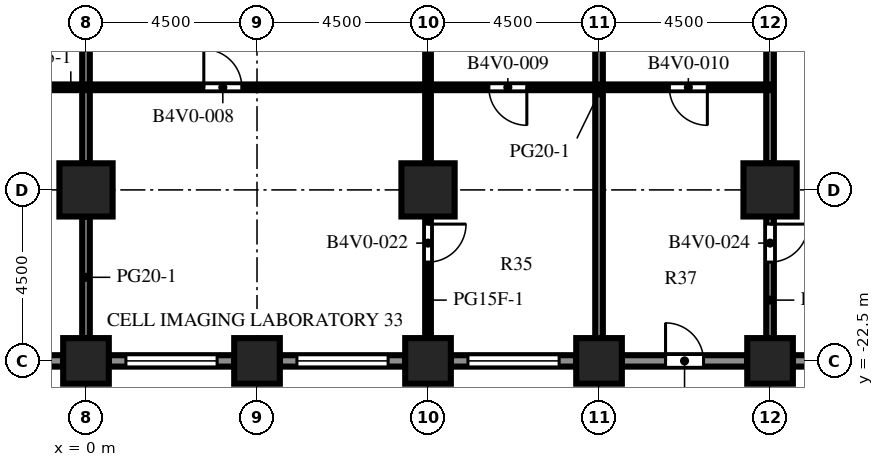
"""IFC4 building model, lengths in metres.
Left out: names, types, materials, properties, quantities, classifications, styles, units other than length and angle.
Written with IfcOpenShell. Run it as: python <this file> out.ifc"""

import sys

from ifc_helpers import new_model, si_unit, direction, frame, frame_2d, origin, origin_2d, place, context, subcontext, project, spatial, rectangle, extrude, element, fill, save


model = new_model("IFC4")
c1 = context("Model", 3, precision=1e-05, world=origin(), true_north=direction((0.0, 1.0)))
c2 = subcontext(c1, "Body", "Model", "MODEL_VIEW")
j1 = project(units=[si_unit("LENGTHUNIT", "METRE"), si_unit("PLANEANGLEUNIT", "RADIAN")], contexts=[c1])
p1 = place(None, origin())
s1 = spatial("IfcSite", under=j1, at=p1, CompositionType="ELEMENT")
p2 = place(p1, origin())
s2 = spatial("IfcBuilding", under=s1, at=p2, CompositionType="ELEMENT")
p3 = place(p2, frame((0.0, 0.0, 120.8)))
s3 = spatial("IfcBuildingStorey", under=s2, at=p3, CompositionType="ELEMENT", Elevation=120.8)
for number, where, z_axis, x_axis in (
    (1, (0.0, -22.5, 0.0), (0.0, 0.0, 1.0), (1.0, 0.0, 0.0)),
    (2, (4.5, -22.5, 0.0), (0.0, 0.0, 1.0), (1.0, 0.0, 0.0)),
    (3, (9.0, -22.5, 0.0), (0.0, 0.0, 1.0), (1.0, 0.0, 0.0)),
    (4, (13.5, -22.5, 0.0), (0.0, 0.0, 1.0), (1.0, 0.0, 0.0)),
    (5, (18.0, -22.5, 0.0), (0.0, 0.0, 1.0), (1.0, 0.0, 0.0)),
):
    element("IfcColumn", number, at=place(p3, frame(where, z_axis=z_axis, x_axis=x_axis)), inside=s3, PredefinedType="COLUMN", context=c2, shape_type="SweptSolid", body=[
        extrude(rectangle(XDim=1.2, YDim=1.2, at=origin_2d()), origin(), (0.0, 0.0, 1.0), 4.1),
    ])
for number, where, z_axis, x_axis in (
    (6, (0.0, -18.0, 0.0), (0.0, 0.0, 1.0), (1.0, 0.0, 0.0)),
    (7, (9.0, -18.0, 0.0), (0.0, 0.0, 1.0), (1.0, 0.0, 0.0)),
    (8, (18.0, -18.0, 0.0), (0.0, 0.0, 1.0), (1.0, 0.0, 0.0)),
):
    element("IfcColumn", number, at=place(p3, frame(where, z_axis=z_axis, x_axis=x_axis)), inside=s3, PredefinedType="COLUMN", context=c2, shape_type="SweptSolid", body=[
        extrude(rectangle(XDim=1.4, YDim=1.4, at=origin_2d()), origin(), (0.0, 0.0, 1.0), 4.1),
    ])
p4 = place(p3, frame((-0.6, -22.5, 0.0), z_axis=(0.0, 0.0, 1.0), x_axis=(-1.0, 0.0, 0.0)))
e9 = element("IfcWall", 9, at=p4, inside=s3, PredefinedType="SOLIDWALL", context=c2, shape_type="SweptSolid", body=[
    extrude(rectangle(XDim=3.3, YDim=0.3, at=frame_2d((1.65, 0.0))), origin(), (0.0, 0.0, 1.0), 2.75),
])
p5 = place(p4, frame((0.45, 0.0, 0.8)))
e10 = element("IfcOpeningElement", 10, at=p5, cuts=e9, PredefinedType="OPENING", context=c2, shape_type="SweptSolid", body=[
    extrude(rectangle(XDim=2.4, YDim=1.7, at=frame_2d((1.2, 0.85))), frame((0.0, 0.16, 0.0), z_axis=(0.0, -1.0, 0.0), x_axis=(1.0, 0.0, 0.0)), (0.0, 0.0, 1.0), 0.32),
])
p6 = place(p3, frame((3.9, -22.5, 0.0), z_axis=(0.0, 0.0, 1.0), x_axis=(-1.0, 0.0, 0.0)))
e11 = element("IfcWall", 11, at=p6, inside=s3, PredefinedType="SOLIDWALL", context=c2, shape_type="SweptSolid", body=[
    extrude(rectangle(XDim=3.3, YDim=0.3, at=frame_2d((1.65, 0.0))), origin(), (0.0, 0.0, 1.0), 2.75),
])
p7 = place(p6, frame((0.45, 0.0, 0.8)))
e12 = element("IfcOpeningElement", 12, at=p7, cuts=e11, PredefinedType="OPENING", context=c2, shape_type="SweptSolid", body=[
    extrude(rectangle(XDim=2.4, YDim=1.7, at=frame_2d((1.2, 0.85))), frame((0.0, 0.16, 0.0), z_axis=(0.0, -1.0, 0.0), x_axis=(1.0, 0.0, 0.0)), (0.0, 0.0, 1.0), 0.32),
])
p8 = place(p3, frame((8.4, -22.5, 0.0), z_axis=(0.0, 0.0, 1.0), x_axis=(-1.0, 0.0, 0.0)))
e13 = element("IfcWall", 13, at=p8, inside=s3, PredefinedType="SOLIDWALL", context=c2, shape_type="SweptSolid", body=[
    extrude(rectangle(XDim=3.3, YDim=0.3, at=frame_2d((1.65, 0.0))), origin(), (0.0, 0.0, 1.0), 2.75),
])
p9 = place(p8, frame((0.45, 0.0, 0.8)))
e14 = element("IfcOpeningElement", 14, at=p9, cuts=e13, PredefinedType="OPENING", context=c2, shape_type="SweptSolid", body=[
    extrude(rectangle(XDim=2.4, YDim=1.7, at=frame_2d((1.2, 0.85))), frame((0.0, 0.16, 0.0), z_axis=(0.0, -1.0, 0.0), x_axis=(1.0, 0.0, 0.0)), (0.0, 0.0, 1.0), 0.32),
])
p10 = place(p3, frame((12.9, -22.5, 0.0), z_axis=(0.0, 0.0, 1.0), x_axis=(-1.0, 0.0, 0.0)))
e15 = element("IfcWall", 15, at=p10, inside=s3, PredefinedType="SOLIDWALL", context=c2, shape_type="SweptSolid", body=[
    extrude(rectangle(XDim=3.3, YDim=0.3, at=frame_2d((1.65, 0.0))), origin(), (0.0, 0.0, 1.0), 2.75),
])
p11 = place(p10, frame((0.45, 0.0, 0.8)))
e16 = element("IfcOpeningElement", 16, at=p11, cuts=e15, PredefinedType="OPENING", context=c2, shape_type="SweptSolid", body=[
    extrude(rectangle(XDim=2.4, YDim=1.7, at=frame_2d((1.2, 0.85))), frame((0.0, 0.16, 0.0), z_axis=(0.0, -1.0, 0.0), x_axis=(1.0, 0.0, 0.0)), (0.0, 0.0, 1.0), 0.32),
])
p12 = place(p3, frame((17.4, -22.5, 0.0), z_axis=(0.0, 0.0, 1.0), x_axis=(-1.0, 0.0, 0.0)))
e17 = element("IfcWall", 17, at=p12, inside=s3, PredefinedType="SOLIDWALL", context=c2, shape_type="SweptSolid", body=[
    extrude(rectangle(XDim=3.3, YDim=0.3, at=frame_2d((1.65, 0.0))), origin(), (0.0, 0.0, 1.0), 2.75),
])
p13 = place(p12, frame((1.15, 0.0, 0.0)))
e18 = element("IfcOpeningElement", 18, at=p13, cuts=e17, PredefinedType="OPENING", context=c2, shape_type="SweptSolid", body=[
    extrude(rectangle(XDim=1.0, YDim=2.2, at=frame_2d((0.5, 1.1))), frame((0.0, 0.16, 0.0), z_axis=(0.0, -1.0, 0.0), x_axis=(1.0, 0.0, 0.0)), (0.0, 0.0, 1.0), 0.32),
])
p14 = place(p3, frame((21.9, -22.5, 0.0), z_axis=(0.0, 0.0, 1.0), x_axis=(-1.0, 0.0, 0.0)))
e19 = element("IfcWall", 19, at=p14, inside=s3, PredefinedType="SOLIDWALL", context=c2, shape_type="SweptSolid", body=[
    extrude(rectangle(XDim=3.3, YDim=0.3, at=frame_2d((1.65, 0.0))), origin(), (0.0, 0.0, 1.0), 2.75),
])
p15 = place(p14, frame((1.575, 0.0, 0.8)))
e20 = element("IfcOpeningElement", 20, at=p15, cuts=e19, PredefinedType="OPENING", context=c2, shape_type="SweptSolid", body=[
    extrude(rectangle(XDim=1.2, YDim=1.7, at=frame_2d((0.6, 0.85))), frame((0.0, 0.16, 0.0), z_axis=(0.0, -1.0, 0.0), x_axis=(1.0, 0.0, 0.0)), (0.0, 0.0, 1.0), 0.32),
])
p16 = place(p3, frame((0.0, -21.9, 0.0), z_axis=(0.0, 0.0, 1.0), x_axis=(0.0, 1.0, 0.0)))
e21 = element("IfcWall", 21, at=p16, inside=s3, PredefinedType="PARTITIONING", context=c2, shape_type="SweptSolid", body=[
    extrude(rectangle(XDim=3.2, YDim=0.2, at=frame_2d((1.6, 0.0))), origin(), (0.0, 0.0, 1.0), 3.65),
])
p17 = place(p3, frame((0.0, -17.3, 0.0), z_axis=(0.0, 0.0, 1.0), x_axis=(0.0, 1.0, 0.0)))
e22 = element("IfcWall", 22, at=p17, inside=s3, PredefinedType="PARTITIONING", context=c2, shape_type="SweptSolid", body=[
    extrude(rectangle(XDim=8.3, YDim=0.2, at=frame_2d((4.15, 0.0))), origin(), (0.0, 0.0, 1.0), 3.65),
])
p18 = place(p3, frame((9.0, -18.7, 0.0), z_axis=(0.0, 0.0, 1.0), x_axis=(0.0, -1.0, 0.0)))
e23 = element("IfcWall", 23, at=p18, inside=s3, PredefinedType="PARTITIONING", context=c2, shape_type="SweptSolid", body=[
    extrude(rectangle(XDim=3.2, YDim=0.15, at=frame_2d((1.6, 0.0))), origin(), (0.0, 0.0, 1.0), 3.65),
])
p19 = place(p18, frame((0.2, 0.0, 0.0)))
e24 = element("IfcOpeningElement", 24, at=p19, cuts=e23, PredefinedType="OPENING", context=c2, shape_type="SweptSolid", body=[
    extrude(rectangle(XDim=1.0, YDim=2.1, at=frame_2d((0.5, 1.05))), frame((0.0, 0.085, 0.0), z_axis=(0.0, -1.0, 0.0), x_axis=(1.0, 0.0, 0.0)), (0.0, 0.0, 1.0), 0.17),
])
p20 = place(p3, frame((9.0, -17.3, 0.0), z_axis=(0.0, 0.0, 1.0), x_axis=(0.0, 1.0, 0.0)))
e25 = element("IfcWall", 25, at=p20, inside=s3, PredefinedType="PARTITIONING", context=c2, shape_type="SweptSolid", body=[
    extrude(rectangle(XDim=8.3, YDim=0.15, at=frame_2d((4.15, 0.0))), origin(), (0.0, 0.0, 1.0), 3.65),
])
p21 = place(p3, frame((13.5, -21.9, 0.0), z_axis=(0.0, 0.0, 1.0), x_axis=(0.0, 1.0, 0.0)))
e26 = element("IfcWall", 26, at=p21, inside=s3, PredefinedType="PARTITIONING", context=c2, shape_type="SweptSolid", body=[
    extrude(rectangle(XDim=12.9, YDim=0.2, at=frame_2d((6.45, 0.0))), origin(), (0.0, 0.0, 1.0), 3.65),
])
p22 = place(p3, frame((18.0, -21.9, 0.0), z_axis=(0.0, 0.0, 1.0), x_axis=(0.0, 1.0, 0.0)))
e27 = element("IfcWall", 27, at=p22, inside=s3, PredefinedType="PARTITIONING", context=c2, shape_type="SweptSolid", body=[
    extrude(rectangle(XDim=3.2, YDim=0.2, at=frame_2d((1.6, 0.0))), origin(), (0.0, 0.0, 1.0), 3.65),
])
p23 = place(p22, frame((2.0, 0.0, 0.0)))
e28 = element("IfcOpeningElement", 28, at=p23, cuts=e27, PredefinedType="OPENING", context=c2, shape_type="SweptSolid", body=[
    extrude(rectangle(XDim=1.0, YDim=2.1, at=frame_2d((0.5, 1.05))), frame((0.0, 0.11, 0.0), z_axis=(0.0, -1.0, 0.0), x_axis=(1.0, 0.0, 0.0)), (0.0, 0.0, 1.0), 0.22),
])
p24 = place(p3, frame((18.0, -17.3, 0.0), z_axis=(0.0, 0.0, 1.0), x_axis=(0.0, 1.0, 0.0)))
e29 = element("IfcWall", 29, at=p24, inside=s3, PredefinedType="PARTITIONING", context=c2, shape_type="SweptSolid", body=[
    extrude(rectangle(XDim=8.3, YDim=0.2, at=frame_2d((4.15, 0.0))), origin(), (0.0, 0.0, 1.0), 3.65),
])
p25 = place(p3, frame((-10.5, -15.3, 0.0), z_axis=(0.0, 0.0, 1.0), x_axis=(1.0, 0.0, 0.0)))
e30 = element("IfcWall", 30, at=p25, inside=s3, PredefinedType="PARTITIONING", context=c2, shape_type="SweptSolid", body=[
    extrude(rectangle(XDim=28.5, YDim=0.15, at=frame_2d((14.25, 0.0))), origin(), (0.0, 0.0, 1.0), 3.65),
])
p26 = place(p25, frame((5.6, 0.0, 0.0)))
e31 = element("IfcOpeningElement", 31, at=p26, cuts=e30, PredefinedType="OPENING", context=c2, shape_type="SweptSolid", body=[
    extrude(rectangle(XDim=1.0, YDim=2.1, at=frame_2d((0.5, 1.05))), frame((0.0, 0.085, 0.0), z_axis=(0.0, -1.0, 0.0), x_axis=(1.0, 0.0, 0.0)), (0.0, 0.0, 1.0), 0.17),
])
p27 = place(p25, frame((13.6, 0.0, 0.0)))
e32 = element("IfcOpeningElement", 32, at=p27, cuts=e30, PredefinedType="OPENING", context=c2, shape_type="SweptSolid", body=[
    extrude(rectangle(XDim=1.0, YDim=2.1, at=frame_2d((0.5, 1.05))), frame((0.0, 0.085, 0.0), z_axis=(0.0, -1.0, 0.0), x_axis=(1.0, 0.0, 0.0)), (0.0, 0.0, 1.0), 0.17),
])
p28 = place(p25, frame((21.1, 0.0, 0.0)))
e33 = element("IfcOpeningElement", 33, at=p28, cuts=e30, PredefinedType="OPENING", context=c2, shape_type="SweptSolid", body=[
    extrude(rectangle(XDim=1.0, YDim=2.1, at=frame_2d((0.5, 1.05))), frame((0.0, 0.085, 0.0), z_axis=(0.0, -1.0, 0.0), x_axis=(1.0, 0.0, 0.0)), (0.0, 0.0, 1.0), 0.17),
])
p29 = place(p25, frame((25.85, 0.0, 0.0)))
e34 = element("IfcOpeningElement", 34, at=p29, cuts=e30, PredefinedType="OPENING", context=c2, shape_type="SweptSolid", body=[
    extrude(rectangle(XDim=1.0, YDim=2.1, at=frame_2d((0.5, 1.05))), frame((0.0, 0.085, 0.0), z_axis=(0.0, -1.0, 0.0), x_axis=(1.0, 0.0, 0.0)), (0.0, 0.0, 1.0), 0.17),
])
p30 = place(p7, origin())
e35 = element("IfcWindow", 35, at=p30, inside=s3, PartitioningType="SINGLE_PANEL", PredefinedType="WINDOW", context=c2, shape_type="SweptSolid", body=[
    extrude(rectangle(XDim=2.4, YDim=1.7, at=frame_2d((1.2, 0.85))), frame((0.0, 0.03, 0.0), z_axis=(0.0, -1.0, 0.0), x_axis=(1.0, 0.0, 0.0)), (0.0, 0.0, 1.0), 0.06),
])
fill(e12, e35)
p31 = place(p9, origin())
e36 = element("IfcWindow", 36, at=p31, inside=s3, PartitioningType="SINGLE_PANEL", PredefinedType="WINDOW", context=c2, shape_type="SweptSolid", body=[
    extrude(rectangle(XDim=2.4, YDim=1.7, at=frame_2d((1.2, 0.85))), frame((0.0, 0.03, 0.0), z_axis=(0.0, -1.0, 0.0), x_axis=(1.0, 0.0, 0.0)), (0.0, 0.0, 1.0), 0.06),
])
fill(e14, e36)
p32 = place(p11, origin())
e37 = element("IfcWindow", 37, at=p32, inside=s3, PartitioningType="SINGLE_PANEL", PredefinedType="WINDOW", context=c2, shape_type="SweptSolid", body=[
    extrude(rectangle(XDim=2.4, YDim=1.7, at=frame_2d((1.2, 0.85))), frame((0.0, 0.03, 0.0), z_axis=(0.0, -1.0, 0.0), x_axis=(1.0, 0.0, 0.0)), (0.0, 0.0, 1.0), 0.06),
])
fill(e16, e37)
p33 = place(p13, origin())
e38 = element("IfcDoor", 38, at=p33, inside=s3, OperationType="SINGLE_SWING_RIGHT", PredefinedType="DOOR", context=c2, shape_type="SweptSolid", body=[
    extrude(rectangle(XDim=1.0, YDim=2.2, at=frame_2d((0.5, 1.1))), frame((0.0, 0.025, 0.0), z_axis=(0.0, -1.0, 0.0), x_axis=(1.0, 0.0, 0.0)), (0.0, 0.0, 1.0), 0.05),
])
fill(e18, e38)
p34 = place(p27, origin())
e39 = element("IfcDoor", 39, at=p34, inside=s3, OperationType="SINGLE_SWING_LEFT", PredefinedType="DOOR", context=c2, shape_type="SweptSolid", body=[
    extrude(rectangle(XDim=1.0, YDim=2.1, at=frame_2d((0.5, 1.05))), frame((0.0, 0.025, 0.0), z_axis=(0.0, -1.0, 0.0), x_axis=(1.0, 0.0, 0.0)), (0.0, 0.0, 1.0), 0.05),
])
fill(e32, e39)
p35 = place(p28, origin())
e40 = element("IfcDoor", 40, at=p35, inside=s3, OperationType="SINGLE_SWING_RIGHT", PredefinedType="DOOR", context=c2, shape_type="SweptSolid", body=[
    extrude(rectangle(XDim=1.0, YDim=2.1, at=frame_2d((0.5, 1.05))), frame((0.0, 0.025, 0.0), z_axis=(0.0, -1.0, 0.0), x_axis=(1.0, 0.0, 0.0)), (0.0, 0.0, 1.0), 0.05),
])
fill(e33, e40)
p36 = place(p29, origin())
e41 = element("IfcDoor", 41, at=p36, inside=s3, OperationType="SINGLE_SWING_RIGHT", PredefinedType="DOOR", context=c2, shape_type="SweptSolid", body=[
    extrude(rectangle(XDim=1.0, YDim=2.1, at=frame_2d((0.5, 1.05))), frame((0.0, 0.025, 0.0), z_axis=(0.0, -1.0, 0.0), x_axis=(1.0, 0.0, 0.0)), (0.0, 0.0, 1.0), 0.05),
])
fill(e34, e41)
p37 = place(p19, origin())
e42 = element("IfcDoor", 42, at=p37, inside=s3, OperationType="SINGLE_SWING_LEFT", PredefinedType="DOOR", context=c2, shape_type="SweptSolid", body=[
    extrude(rectangle(XDim=1.0, YDim=2.1, at=frame_2d((0.5, 1.05))), frame((0.0, 0.025, 0.0), z_axis=(0.0, -1.0, 0.0), x_axis=(1.0, 0.0, 0.0)), (0.0, 0.0, 1.0), 0.05),
])
fill(e24, e42)
p38 = place(p23, origin())
e43 = element("IfcDoor", 43, at=p38, inside=s3, OperationType="SINGLE_SWING_RIGHT", PredefinedType="DOOR", context=c2, shape_type="SweptSolid", body=[
    extrude(rectangle(XDim=1.0, YDim=2.1, at=frame_2d((0.5, 1.05))), frame((0.0, 0.025, 0.0), z_axis=(0.0, -1.0, 0.0), x_axis=(1.0, 0.0, 0.0)), (0.0, 0.0, 1.0), 0.05),
])
fill(e28, e43)
save(model, sys.argv[1])
